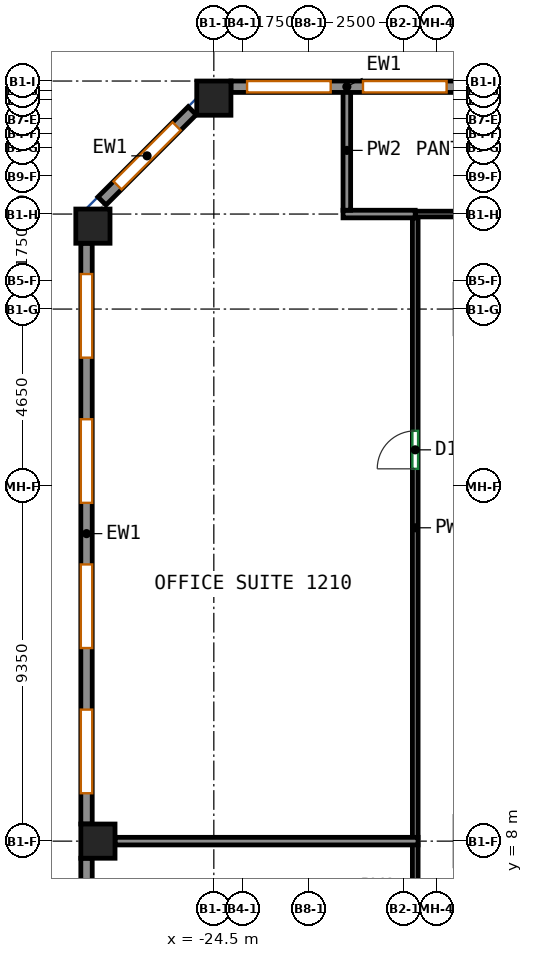
"""IFC4 building model, lengths in metres.
Left out: names, types, materials, properties, quantities, classifications, styles, units other than length and angle.
Written with IfcOpenShell. Run it as: python <this file> out.ifc"""

import sys

from ifc_helpers import new_model, si_unit, direction, frame, frame_2d, origin, origin_2d, place, context, subcontext, project, spatial, rectangle, extrude, source, transform, mapped, element, fill, save


model = new_model("IFC4")
c1 = context("Model", 3, precision=1e-05, world=origin(), true_north=direction((0.0, 1.0)))
c2 = subcontext(c1, "Body", "Model", "MODEL_VIEW")
j1 = project(units=[si_unit("LENGTHUNIT", "METRE"), si_unit("PLANEANGLEUNIT", "RADIAN")], contexts=[c1])
p1 = place(None, origin())
s1 = spatial("IfcSite", under=j1, at=p1, CompositionType="ELEMENT")
p2 = place(p1, origin())
s2 = spatial("IfcBuilding", under=s1, at=p2, CompositionType="ELEMENT")
p3 = place(p2, frame((0.0, 0.0, 55.0)))
s3 = spatial("IfcBuildingStorey", under=s2, at=p3, CompositionType="ELEMENT", Elevation=55.0)
m1 = source(origin(), c2, "Body", "SweptSolid", [
    extrude(rectangle(XDim=0.9, YDim=0.9, at=origin_2d()), origin(), (0.0, 0.0, 1.0), 3.6),
])
for number, where, z_axis, x_axis in (
    (1, (-27.682, 24.182, 0.0), (0.0, 0.0, 1.0), (1.0, 0.0, 0.0)),
    (2, (-27.55, 8.0, 0.0), (0.0, 0.0, 1.0), (1.0, 0.0, 0.0)),
    (3, (-24.5, 27.55, 0.0), (0.0, 0.0, 1.0), (1.0, 0.0, 0.0)),
):
    element("IfcColumn", number, at=place(p3, frame(where, z_axis=z_axis, x_axis=x_axis)), inside=s3, PredefinedType="COLUMN", context=c2, shape_type="MappedRepresentation", body=[
        mapped(m1, transform((0.0, 0.0, 0.0))),
    ])
m2 = source(origin(), c2, "Body", "SweptSolid", [
    extrude(rectangle(XDim=6.1, YDim=0.3, at=frame_2d((3.05, 0.0))), origin(), (0.0, 0.0, 1.0), 3.6),
])
p4 = place(p3, frame((-17.95, 27.85, 0.0), z_axis=(0.0, 0.0, 1.0), x_axis=(-1.0, 0.0, 0.0)))
e4 = element("IfcWall", 4, at=p4, inside=s3, PredefinedType="SOLIDWALL", context=c2, shape_type="MappedRepresentation", body=[
    mapped(m2, transform((0.0, 0.0, 0.0))),
])
p5 = place(p4, frame((0.425, 0.0, 0.7)))
e5 = element("IfcOpeningElement", 5, at=p5, cuts=e4, PredefinedType="OPENING", context=c2, shape_type="SweptSolid", body=[
    extrude(rectangle(XDim=2.2, YDim=2.25, at=frame_2d((1.1, 1.125))), frame((0.0, 0.16, 0.0), z_axis=(0.0, -1.0, 0.0), x_axis=(1.0, 0.0, 0.0)), (0.0, 0.0, 1.0), 0.32),
])
p6 = place(p4, frame((3.475, 0.0, 0.7)))
e6 = element("IfcOpeningElement", 6, at=p6, cuts=e4, PredefinedType="OPENING", context=c2, shape_type="SweptSolid", body=[
    extrude(rectangle(XDim=2.2, YDim=2.25, at=frame_2d((1.1, 1.125))), frame((0.0, 0.16, 0.0), z_axis=(0.0, -1.0, 0.0), x_axis=(1.0, 0.0, 0.0)), (0.0, 0.0, 1.0), 0.32),
])
m3 = source(origin(), c2, "Body", "SweptSolid", [
    extrude(rectangle(XDim=3.359, YDim=0.3, at=frame_2d((1.679, 0.0))), origin(), (0.0, 0.0, 1.0), 3.6),
])
p7 = place(p3, frame((-25.069, 27.219, 0.0), z_axis=(0.0, 0.0, 1.0), x_axis=(-0.707143122278, -0.707070438228, 0.0)))
e7 = element("IfcWall", 7, at=p7, inside=s3, PredefinedType="SOLIDWALL", context=c2, shape_type="MappedRepresentation", body=[
    mapped(m3, transform((0.0, 0.0, 0.0))),
])
p8 = place(p7, frame((0.579, 0.0, 0.7)))
e8 = element("IfcOpeningElement", 8, at=p8, cuts=e7, PredefinedType="OPENING", context=c2, shape_type="SweptSolid", body=[
    extrude(rectangle(XDim=2.2, YDim=2.25, at=frame_2d((1.1, 1.125))), frame((0.0, 0.16, 0.0), z_axis=(0.0, -1.0, 0.0), x_axis=(1.0, 0.0, 0.0)), (0.0, 0.0, 1.0), 0.32),
])
m4 = source(origin(), c2, "Body", "SweptSolid", [
    extrude(rectangle(XDim=15.282, YDim=0.3, at=frame_2d((7.641, 0.0))), origin(), (0.0, 0.0, 1.0), 3.6),
])
p9 = place(p3, frame((-27.85, 23.732, 0.0), z_axis=(0.0, 0.0, 1.0), x_axis=(0.0, -1.0, 0.0)))
e9 = element("IfcWall", 9, at=p9, inside=s3, PredefinedType="SOLIDWALL", context=c2, shape_type="MappedRepresentation", body=[
    mapped(m4, transform((0.0, 0.0, 0.0))),
])
p10 = place(p9, frame((0.81, 0.0, 0.7)))
e10 = element("IfcOpeningElement", 10, at=p10, cuts=e9, PredefinedType="OPENING", context=c2, shape_type="SweptSolid", body=[
    extrude(rectangle(XDim=2.2, YDim=2.25, at=frame_2d((1.1, 1.125))), frame((0.0, 0.16, 0.0), z_axis=(0.0, -1.0, 0.0), x_axis=(1.0, 0.0, 0.0)), (0.0, 0.0, 1.0), 0.32),
])
p11 = place(p9, frame((4.631, 0.0, 0.7)))
e11 = element("IfcOpeningElement", 11, at=p11, cuts=e9, PredefinedType="OPENING", context=c2, shape_type="SweptSolid", body=[
    extrude(rectangle(XDim=2.2, YDim=2.25, at=frame_2d((1.1, 1.125))), frame((0.0, 0.16, 0.0), z_axis=(0.0, -1.0, 0.0), x_axis=(1.0, 0.0, 0.0)), (0.0, 0.0, 1.0), 0.32),
])
p12 = place(p9, frame((8.451, 0.0, 0.7)))
e12 = element("IfcOpeningElement", 12, at=p12, cuts=e9, PredefinedType="OPENING", context=c2, shape_type="SweptSolid", body=[
    extrude(rectangle(XDim=2.2, YDim=2.25, at=frame_2d((1.1, 1.125))), frame((0.0, 0.16, 0.0), z_axis=(0.0, -1.0, 0.0), x_axis=(1.0, 0.0, 0.0)), (0.0, 0.0, 1.0), 0.32),
])
p13 = place(p9, frame((12.271, 0.0, 0.7)))
e13 = element("IfcOpeningElement", 13, at=p13, cuts=e9, PredefinedType="OPENING", context=c2, shape_type="SweptSolid", body=[
    extrude(rectangle(XDim=2.2, YDim=2.25, at=frame_2d((1.1, 1.125))), frame((0.0, 0.16, 0.0), z_axis=(0.0, -1.0, 0.0), x_axis=(1.0, 0.0, 0.0)), (0.0, 0.0, 1.0), 0.32),
])
m5 = source(origin(), c2, "Body", "SweptSolid", [
    extrude(rectangle(XDim=8.1, YDim=0.3, at=frame_2d((4.05, 0.0))), origin(), (0.0, 0.0, 1.0), 3.6),
])
p14 = place(p3, frame((-27.85, 7.55, 0.0), z_axis=(0.0, 0.0, 1.0), x_axis=(0.0, -1.0, 0.0)))
e14 = element("IfcWall", 14, at=p14, inside=s3, PredefinedType="SOLIDWALL", context=c2, shape_type="MappedRepresentation", body=[
    mapped(m5, transform((0.0, 0.0, 0.0))),
])
p15 = place(p14, frame((0.925, 0.0, 0.7)))
e15 = element("IfcOpeningElement", 15, at=p15, cuts=e14, PredefinedType="OPENING", context=c2, shape_type="SweptSolid", body=[
    extrude(rectangle(XDim=2.2, YDim=2.25, at=frame_2d((1.1, 1.125))), frame((0.0, 0.16, 0.0), z_axis=(0.0, -1.0, 0.0), x_axis=(1.0, 0.0, 0.0)), (0.0, 0.0, 1.0), 0.32),
])
p16 = place(p14, frame((4.975, 0.0, 0.7)))
e16 = element("IfcOpeningElement", 16, at=p16, cuts=e14, PredefinedType="OPENING", context=c2, shape_type="SweptSolid", body=[
    extrude(rectangle(XDim=2.2, YDim=2.25, at=frame_2d((1.1, 1.125))), frame((0.0, 0.16, 0.0), z_axis=(0.0, -1.0, 0.0), x_axis=(1.0, 0.0, 0.0)), (0.0, 0.0, 1.0), 0.32),
])
p17 = place(p3, frame((-19.2, 5.675, 0.0), z_axis=(0.0, 0.0, 1.0), x_axis=(0.0, 1.0, 0.0)))
e17 = element("IfcWall", 17, at=p17, inside=s3, PredefinedType="PARTITIONING", context=c2, shape_type="SweptSolid", body=[
    extrude(rectangle(XDim=2.235, YDim=0.15, at=frame_2d((1.117, 0.0))), origin(), (0.0, 0.0, 1.0), 3.6),
])
p18 = place(p3, frame((-19.2, 24.5, 0.0), z_axis=(0.0, 0.0, 1.0), x_axis=(1.0, 0.0, 0.0)))
e18 = element("IfcWall", 18, at=p18, inside=s3, PredefinedType="PARTITIONING", context=c2, shape_type="SweptSolid", body=[
    extrude(rectangle(XDim=40.275, YDim=0.15, at=frame_2d((20.137, 0.0))), origin(), (0.0, 0.0, 1.0), 2.95),
])
p19 = place(p18, frame((3.007, 0.0, 0.0)))
e19 = element("IfcOpeningElement", 19, at=p19, cuts=e18, PredefinedType="OPENING", context=c2, shape_type="SweptSolid", body=[
    extrude(rectangle(XDim=0.9, YDim=2.1, at=frame_2d((0.45, 1.05))), frame((0.0, 0.085, 0.0), z_axis=(0.0, -1.0, 0.0), x_axis=(1.0, 0.0, 0.0)), (0.0, 0.0, 1.0), 0.17),
])
p20 = place(p18, frame((5.59, 0.0, 0.0)))
e20 = element("IfcOpeningElement", 20, at=p20, cuts=e18, PredefinedType="OPENING", context=c2, shape_type="SweptSolid", body=[
    extrude(rectangle(XDim=0.9, YDim=2.1, at=frame_2d((0.45, 1.05))), frame((0.0, 0.085, 0.0), z_axis=(0.0, -1.0, 0.0), x_axis=(1.0, 0.0, 0.0)), (0.0, 0.0, 1.0), 0.17),
])
p21 = place(p18, frame((38.674, 0.0, 0.0)))
e21 = element("IfcOpeningElement", 21, at=p21, cuts=e18, PredefinedType="OPENING", context=c2, shape_type="SweptSolid", body=[
    extrude(rectangle(XDim=1.0, YDim=2.1, at=frame_2d((0.5, 1.05))), frame((0.0, 0.085, 0.0), z_axis=(0.0, -1.0, 0.0), x_axis=(1.0, 0.0, 0.0)), (0.0, 0.0, 1.0), 0.17),
])
p22 = place(p3, frame((-19.2, 8.09, 0.0), z_axis=(0.0, 0.0, 1.0), x_axis=(0.0, 1.0, 0.0)))
e22 = element("IfcWall", 22, at=p22, inside=s3, PredefinedType="PARTITIONING", context=c2, shape_type="SweptSolid", body=[
    extrude(rectangle(XDim=16.31, YDim=0.15, at=frame_2d((8.155, 0.0))), origin(), (0.0, 0.0, 1.0), 3.6),
])
p23 = place(p22, frame((9.706, 0.0, 0.0)))
e23 = element("IfcOpeningElement", 23, at=p23, cuts=e22, PredefinedType="OPENING", context=c2, shape_type="SweptSolid", body=[
    extrude(rectangle(XDim=1.0, YDim=2.1, at=frame_2d((0.5, 1.05))), frame((0.0, 0.085, 0.0), z_axis=(0.0, -1.0, 0.0), x_axis=(1.0, 0.0, 0.0)), (0.0, 0.0, 1.0), 0.17),
])
p24 = place(p3, frame((-19.126, 8.0, 0.0), z_axis=(0.0, 0.0, 1.0), x_axis=(-1.0, 0.0, 0.0)))
e24 = element("IfcWall", 24, at=p24, inside=s3, PredefinedType="PARTITIONING", context=c2, shape_type="SweptSolid", body=[
    extrude(rectangle(XDim=7.974, YDim=0.2, at=frame_2d((3.987, 0.0))), origin(), (0.0, 0.0, 1.0), 2.95),
])
p25 = place(p3, frame((-21.1, 24.5, 0.0), z_axis=(0.0, 0.0, 1.0), x_axis=(1.0, 0.0, 0.0)))
e25 = element("IfcWall", 25, at=p25, inside=s3, PredefinedType="PARTITIONING", context=c2, shape_type="SweptSolid", body=[
    extrude(rectangle(XDim=1.899, YDim=0.2, at=frame_2d((0.95, 0.0))), origin(), (0.0, 0.0, 1.0), 2.95),
])
p26 = place(p3, frame((-21.0, 24.6, 0.0), z_axis=(0.0, 0.0, 1.0), x_axis=(0.0, 1.0, 0.0)))
e26 = element("IfcWall", 26, at=p26, inside=s3, PredefinedType="PARTITIONING", context=c2, shape_type="SweptSolid", body=[
    extrude(rectangle(XDim=3.15, YDim=0.2, at=frame_2d((1.575, 0.0))), origin(), (0.0, 0.0, 1.0), 3.6),
])
p27 = place(p5, origin())
e27 = element("IfcWindow", 27, at=p27, inside=s3, PartitioningType="SINGLE_PANEL", PredefinedType="WINDOW", context=c2, shape_type="SweptSolid", body=[
    extrude(rectangle(XDim=2.2, YDim=2.25, at=frame_2d((1.1, 1.125))), frame((0.0, 0.03, 0.0), z_axis=(0.0, -1.0, 0.0), x_axis=(1.0, 0.0, 0.0)), (0.0, 0.0, 1.0), 0.06),
])
fill(e5, e27)
p28 = place(p6, origin())
e28 = element("IfcWindow", 28, at=p28, inside=s3, PartitioningType="SINGLE_PANEL", PredefinedType="WINDOW", context=c2, shape_type="SweptSolid", body=[
    extrude(rectangle(XDim=2.2, YDim=2.25, at=frame_2d((1.1, 1.125))), frame((0.0, 0.03, 0.0), z_axis=(0.0, -1.0, 0.0), x_axis=(1.0, 0.0, 0.0)), (0.0, 0.0, 1.0), 0.06),
])
fill(e6, e28)
p29 = place(p8, origin())
e29 = element("IfcWindow", 29, at=p29, inside=s3, PartitioningType="SINGLE_PANEL", PredefinedType="WINDOW", context=c2, shape_type="SweptSolid", body=[
    extrude(rectangle(XDim=2.2, YDim=2.25, at=frame_2d((1.1, 1.125))), frame((0.0, 0.03, 0.0), z_axis=(0.0, -1.0, 0.0), x_axis=(1.0, 0.0, 0.0)), (0.0, 0.0, 1.0), 0.06),
])
fill(e8, e29)
p30 = place(p10, origin())
e30 = element("IfcWindow", 30, at=p30, inside=s3, PartitioningType="SINGLE_PANEL", PredefinedType="WINDOW", context=c2, shape_type="SweptSolid", body=[
    extrude(rectangle(XDim=2.2, YDim=2.25, at=frame_2d((1.1, 1.125))), frame((0.0, 0.03, 0.0), z_axis=(0.0, -1.0, 0.0), x_axis=(1.0, 0.0, 0.0)), (0.0, 0.0, 1.0), 0.06),
])
fill(e10, e30)
p31 = place(p11, origin())
e31 = element("IfcWindow", 31, at=p31, inside=s3, PartitioningType="SINGLE_PANEL", PredefinedType="WINDOW", context=c2, shape_type="SweptSolid", body=[
    extrude(rectangle(XDim=2.2, YDim=2.25, at=frame_2d((1.1, 1.125))), frame((0.0, 0.03, 0.0), z_axis=(0.0, -1.0, 0.0), x_axis=(1.0, 0.0, 0.0)), (0.0, 0.0, 1.0), 0.06),
])
fill(e11, e31)
p32 = place(p12, origin())
e32 = element("IfcWindow", 32, at=p32, inside=s3, PartitioningType="SINGLE_PANEL", PredefinedType="WINDOW", context=c2, shape_type="SweptSolid", body=[
    extrude(rectangle(XDim=2.2, YDim=2.25, at=frame_2d((1.1, 1.125))), frame((0.0, 0.03, 0.0), z_axis=(0.0, -1.0, 0.0), x_axis=(1.0, 0.0, 0.0)), (0.0, 0.0, 1.0), 0.06),
])
fill(e12, e32)
p33 = place(p13, origin())
e33 = element("IfcWindow", 33, at=p33, inside=s3, PartitioningType="SINGLE_PANEL", PredefinedType="WINDOW", context=c2, shape_type="SweptSolid", body=[
    extrude(rectangle(XDim=2.2, YDim=2.25, at=frame_2d((1.1, 1.125))), frame((0.0, 0.03, 0.0), z_axis=(0.0, -1.0, 0.0), x_axis=(1.0, 0.0, 0.0)), (0.0, 0.0, 1.0), 0.06),
])
fill(e13, e33)
p34 = place(p23, origin())
e34 = element("IfcDoor", 34, at=p34, inside=s3, OperationType="SINGLE_SWING_LEFT", PredefinedType="DOOR", context=c2, shape_type="SweptSolid", body=[
    extrude(rectangle(XDim=1.0, YDim=2.1, at=frame_2d((0.5, 1.05))), frame((0.0, 0.025, 0.0), z_axis=(0.0, -1.0, 0.0), x_axis=(1.0, 0.0, 0.0)), (0.0, 0.0, 1.0), 0.05),
])
fill(e23, e34)
save(model, sys.argv[1])
